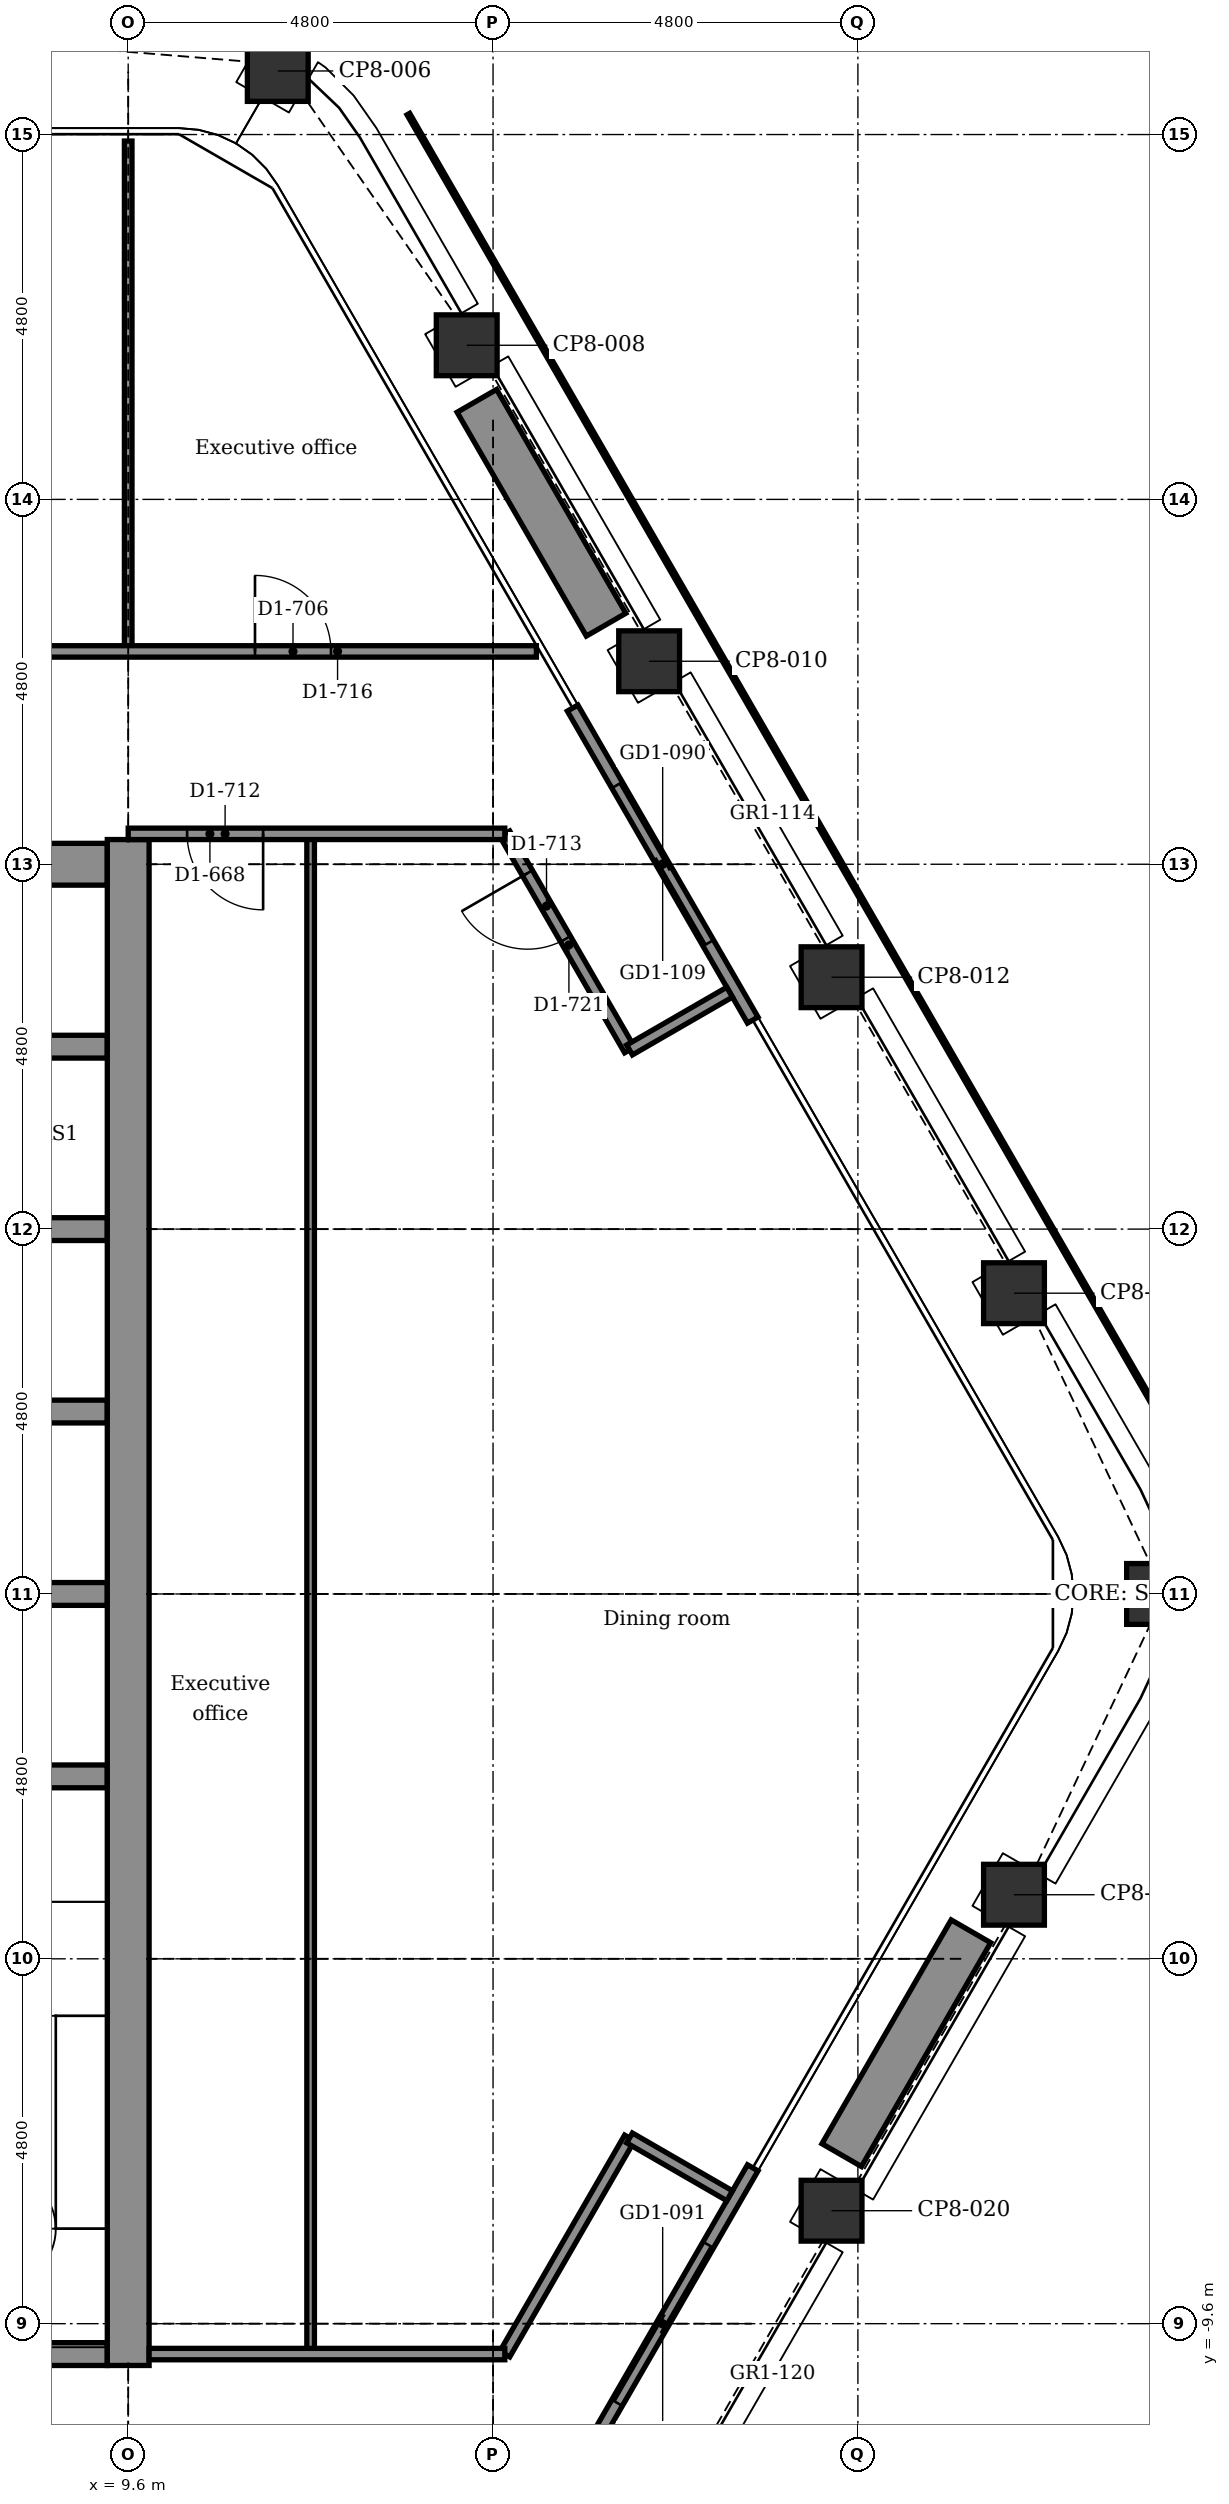
"""IFC4 building model, lengths in metres.
Left out: names, types, materials, properties, quantities, classifications, styles, units other than length and angle.
Written with IfcOpenShell. Run it as: python <this file> out.ifc"""

import sys

from ifc_helpers import new_model, si_unit, direction, frame, frame_2d, origin, origin_2d, place, context, subcontext, project, spatial, rectangle, extrude, element, fill, save


model = new_model("IFC4")
c1 = context("Model", 3, precision=1e-05, world=origin(), true_north=direction((0.0, 1.0)))
c2 = subcontext(c1, "Body", "Model", "MODEL_VIEW")
j1 = project(units=[si_unit("LENGTHUNIT", "METRE"), si_unit("PLANEANGLEUNIT", "RADIAN")], contexts=[c1])
p1 = place(None, origin())
s1 = spatial("IfcSite", under=j1, at=p1, CompositionType="ELEMENT")
p2 = place(p1, origin())
s2 = spatial("IfcBuilding", under=s1, at=p2, CompositionType="ELEMENT")
p3 = place(p2, frame((0.0, 0.0, 257.9)))
s3 = spatial("IfcBuildingStorey", under=s2, at=p3, CompositionType="ELEMENT", Elevation=257.9)
for number, where, z_axis, x_axis in (
    (1, (11.568, 20.036, -0.15), (0.0, 0.0, 1.0), (0.5, 0.866, 0.0)),
    (2, (14.054, 16.428, -0.15), (0.0, 0.0, 1.0), (0.866, 0.5, 0.0)),
    (3, (16.454, 12.271, -0.15), (0.0, 0.0, 1.0), (0.866, 0.5, 0.0)),
    (4, (18.854, 8.114, -0.15), (0.0, 0.0, 1.0), (0.866, 0.5, 0.0)),
    (5, (21.254, 3.957, -0.15), (0.0, 0.0, 1.0), (0.866, 0.5, 0.0)),
    (6, (23.136, 0.0, -0.15), (0.0, 0.0, 1.0), (1.0, 0.0, 0.0)),
    (7, (21.254, -3.957, -0.15), (0.0, 0.0, 1.0), (0.5, 0.866, 0.0)),
    (8, (18.854, -8.114, -0.15), (0.0, 0.0, 1.0), (0.5, 0.866, 0.0)),
):
    element("IfcColumn", number, at=place(p3, frame(where, z_axis=z_axis, x_axis=x_axis)), inside=s3, PredefinedType="COLUMN", context=c2, shape_type="SweptSolid", body=[
        extrude(rectangle(XDim=0.8, YDim=0.8, at=origin_2d()), origin(), (0.0, 0.0, 1.0), 3.9),
    ])
p4 = place(p3, frame((4.95, -10.0, -0.15), z_axis=(0.0, 0.0, 1.0), x_axis=(1.0, 0.0, 0.0)))
e9 = element("IfcWall", 9, at=p4, inside=s3, PredefinedType="STANDARD", context=c2, shape_type="SweptSolid", body=[
    extrude(rectangle(XDim=4.375, YDim=0.3, at=frame_2d((2.188, 0.0))), origin(), (0.0, 0.0, 1.0), 3.9),
])
for number, where, z_axis, x_axis in (
    (10, (6.15, -2.4, -0.15), (0.0, 0.0, 1.0), (1.0, 0.0, 0.0)),
    (11, (6.15, 0.0, -0.15), (0.0, 0.0, 1.0), (1.0, 0.0, 0.0)),
    (12, (6.15, 2.4, -0.15), (0.0, 0.0, 1.0), (1.0, 0.0, 0.0)),
    (13, (6.15, 4.8, -0.15), (0.0, 0.0, 1.0), (1.0, 0.0, 0.0)),
):
    element("IfcWall", number, at=place(p3, frame(where, z_axis=z_axis, x_axis=x_axis)), inside=s3, PredefinedType="STANDARD", context=c2, shape_type="SweptSolid", body=[
        extrude(rectangle(XDim=3.175, YDim=0.3, at=frame_2d((1.587, 0.0))), origin(), (0.0, 0.0, 1.0), 3.9),
    ])
p5 = place(p3, frame((6.0, 7.2, -0.15), z_axis=(0.0, 0.0, 1.0), x_axis=(1.0, 0.0, 0.0)))
e14 = element("IfcWall", 14, at=p5, inside=s3, PredefinedType="STANDARD", context=c2, shape_type="SweptSolid", body=[
    extrude(rectangle(XDim=3.325, YDim=0.3, at=frame_2d((1.663, 0.0))), origin(), (0.0, 0.0, 1.0), 3.9),
])
p6 = place(p3, frame((-5.25, 9.6, -0.15), z_axis=(0.0, 0.0, 1.0), x_axis=(1.0, 0.0, 0.0)))
e15 = element("IfcWall", 15, at=p6, inside=s3, PredefinedType="SHEAR", context=c2, shape_type="SweptSolid", body=[
    extrude(rectangle(XDim=14.575, YDim=0.55, at=frame_2d((7.288, 0.0))), origin(), (0.0, 0.0, 1.0), 3.9),
])
p7 = place(p6, frame((0.6, 0.0, 0.15)))
e16 = element("IfcOpeningElement", 16, at=p7, cuts=e15, PredefinedType="OPENING", context=c2, shape_type="SweptSolid", body=[
    extrude(rectangle(XDim=0.9, YDim=2.1, at=frame_2d((0.45, 1.05))), frame((0.0, 0.285, 0.0), z_axis=(0.0, -1.0, 0.0), x_axis=(1.0, 0.0, 0.0)), (0.0, 0.0, 1.0), 0.57),
])
p8 = place(p3, frame((9.6, -10.15, -0.15), z_axis=(0.0, 0.0, 1.0), x_axis=(0.0, 1.0, 0.0)))
e17 = element("IfcWall", 17, at=p8, inside=s3, PredefinedType="SHEAR", context=c2, shape_type="SweptSolid", body=[
    extrude(rectangle(XDim=20.075, YDim=0.55, at=frame_2d((10.038, 0.0))), origin(), (0.0, 0.0, 1.0), 3.9),
])
p9 = place(p3, frame((15.447, 11.655, 0.0), z_axis=(0.0, 0.0, 1.0), x_axis=(0.499978080042, -0.866038058908, 0.0)))
e18 = element("IfcWall", 18, at=p9, inside=s3, PredefinedType="PARTITIONING", context=c2, shape_type="SweptSolid", body=[
    extrude(rectangle(XDim=4.74, YDim=0.16, at=frame_2d((2.37, 0.0))), origin(), (0.0, 0.0, 1.0), 3.75),
])
p10 = place(p9, frame((1.17, 0.0, 0.0)))
e19 = element("IfcOpeningElement", 19, at=p10, cuts=e18, PredefinedType="OPENING", context=c2, shape_type="SweptSolid", body=[
    extrude(rectangle(XDim=2.4, YDim=2.4, at=frame_2d((1.2, 1.2))), frame((0.0, 0.09, 0.0), z_axis=(0.0, -1.0, 0.0), x_axis=(1.0, 0.0, 0.0)), (0.0, 0.0, 1.0), 0.18),
])
p11 = place(p3, frame((17.817, -7.55, 0.0), z_axis=(0.0, 0.0, 1.0), x_axis=(-0.499978080042, -0.866038058908, 0.0)))
e20 = element("IfcWall", 20, at=p11, inside=s3, PredefinedType="PARTITIONING", context=c2, shape_type="SweptSolid", body=[
    extrude(rectangle(XDim=4.74, YDim=0.16, at=frame_2d((2.37, 0.0))), origin(), (0.0, 0.0, 1.0), 3.75),
])
p12 = place(p11, frame((1.17, 0.0, 0.0)))
e21 = element("IfcOpeningElement", 21, at=p12, cuts=e20, PredefinedType="OPENING", context=c2, shape_type="SweptSolid", body=[
    extrude(rectangle(XDim=2.4, YDim=2.4, at=frame_2d((1.2, 1.2))), frame((0.0, 0.09, 0.0), z_axis=(0.0, -1.0, 0.0), x_axis=(1.0, 0.0, 0.0)), (0.0, 0.0, 1.0), 0.18),
])
p13 = place(p3, frame((14.187, 15.697, 0.0), z_axis=(0.0, 0.0, 1.0), x_axis=(0.499977295307, -0.866038511948, 0.0)))
e22 = element("IfcWall", 22, at=p13, inside=s3, PredefinedType="USERDEFINED", context=c2, shape_type="SweptSolid", body=[
    extrude(rectangle(XDim=3.4, YDim=0.6, at=frame_2d((1.7, 0.0))), origin(), (0.0, 0.0, 1.0), 0.7),
])
p14 = place(p3, frame((20.687, -4.438, 0.0), z_axis=(0.0, 0.0, 1.0), x_axis=(-0.500008388397, -0.866020560687, 0.0)))
e23 = element("IfcWall", 23, at=p14, inside=s3, PredefinedType="USERDEFINED", context=c2, shape_type="SweptSolid", body=[
    extrude(rectangle(XDim=3.4, YDim=0.6, at=frame_2d((1.7, 0.0))), origin(), (0.0, 0.0, 1.0), 0.7),
])
p15 = place(p3, frame((12.0, -10.0, 0.0), z_axis=(0.0, 0.0, 1.0), x_axis=(0.0, 1.0, 0.0)))
e24 = element("IfcWall", 24, at=p15, inside=s3, PredefinedType="PARTITIONING", context=c2, shape_type="SweptSolid", body=[
    extrude(rectangle(XDim=20.0, YDim=0.1, at=frame_2d((10.0, 0.0))), origin(), (0.0, 0.0, 1.0), 3.75),
])
p16 = place(p3, frame((9.6, 12.4, 0.0), z_axis=(0.0, 0.0, 1.0), x_axis=(0.0, 1.0, 0.0)))
e25 = element("IfcWall", 25, at=p16, inside=s3, PredefinedType="PARTITIONING", context=c2, shape_type="SweptSolid", body=[
    extrude(rectangle(XDim=6.715, YDim=0.1, at=frame_2d((3.357, 0.0))), origin(), (0.0, 0.0, 1.0), 3.217),
])
p17 = place(p3, frame((14.555, 10.0, 0.0), z_axis=(0.0, 0.0, 1.0), x_axis=(0.499954196102, -0.866051847062, 0.0)))
e26 = element("IfcWall", 26, at=p17, inside=s3, PredefinedType="PARTITIONING", context=c2, shape_type="SweptSolid", body=[
    extrude(rectangle(XDim=3.283, YDim=0.15, at=frame_2d((1.642, 0.0))), origin(), (0.0, 0.0, 1.0), 3.75),
])
p18 = place(p17, frame((0.597, 0.0, 0.0)))
e27 = element("IfcOpeningElement", 27, at=p18, cuts=e26, PredefinedType="OPENING", context=c2, shape_type="SweptSolid", body=[
    extrude(rectangle(XDim=1.0, YDim=2.1, at=frame_2d((0.5, 1.05))), frame((0.0, 0.085, 0.0), z_axis=(0.0, -1.0, 0.0), x_axis=(1.0, 0.0, 0.0)), (0.0, 0.0, 1.0), 0.17),
])
p19 = place(p3, frame((14.555, -10.0, 0.0), z_axis=(0.0, 0.0, 1.0), x_axis=(0.499954196102, 0.866051847062, 0.0)))
e28 = element("IfcWall", 28, at=p19, inside=s3, PredefinedType="PARTITIONING", context=c2, shape_type="SweptSolid", body=[
    extrude(rectangle(XDim=3.283, YDim=0.15, at=frame_2d((1.642, 0.0))), origin(), (0.0, 0.0, 1.0), 3.75),
])
for number, where, z_axis, x_axis in (
    (29, (16.196, -7.157, 0.0), (0.0, 0.0, 1.0), (0.866, -0.5, 0.0)),
    (30, (16.196, 7.157, 0.0), (0.0, 0.0, 1.0), (0.866, 0.5, 0.0)),
):
    element("IfcWall", number, at=place(p3, frame(where, z_axis=z_axis, x_axis=x_axis)), inside=s3, PredefinedType="PARTITIONING", context=c2, shape_type="SweptSolid", body=[
        extrude(rectangle(XDim=1.52, YDim=0.15, at=frame_2d((0.76, 0.0))), origin(), (0.0, 0.0, 1.0), 3.75),
    ])
p20 = place(p3, frame((9.875, -10.0, 0.0), z_axis=(0.0, 0.0, 1.0), x_axis=(1.0, 0.0, 0.0)))
e31 = element("IfcWall", 31, at=p20, inside=s3, PredefinedType="PARTITIONING", context=c2, shape_type="SweptSolid", body=[
    extrude(rectangle(XDim=4.68, YDim=0.15, at=frame_2d((2.34, 0.0))), origin(), (0.0, 0.0, 1.0), 3.75),
])
p21 = place(p3, frame((9.6, 10.0, 0.0), z_axis=(0.0, 0.0, 1.0), x_axis=(1.0, 0.0, 0.0)))
e32 = element("IfcWall", 32, at=p21, inside=s3, PredefinedType="PARTITIONING", context=c2, shape_type="SweptSolid", body=[
    extrude(rectangle(XDim=4.955, YDim=0.15, at=frame_2d((2.477, 0.0))), origin(), (0.0, 0.0, 1.0), 3.75),
])
p22 = place(p21, frame((0.775, 0.0, 0.0)))
e33 = element("IfcOpeningElement", 33, at=p22, cuts=e32, PredefinedType="OPENING", context=c2, shape_type="SweptSolid", body=[
    extrude(rectangle(XDim=1.0, YDim=2.1, at=frame_2d((0.5, 1.05))), frame((0.0, 0.085, 0.0), z_axis=(0.0, -1.0, 0.0), x_axis=(1.0, 0.0, 0.0)), (0.0, 0.0, 1.0), 0.17),
])
p23 = place(p3, frame((-14.97, 12.4, 0.0), z_axis=(0.0, 0.0, 1.0), x_axis=(1.0, 0.0, 0.0)))
e34 = element("IfcWall", 34, at=p23, inside=s3, PredefinedType="PARTITIONING", context=c2, shape_type="SweptSolid", body=[
    extrude(rectangle(XDim=29.94, YDim=0.15, at=frame_2d((14.97, 0.0))), origin(), (0.0, 0.0, 1.0), 3.75),
])
p24 = place(p23, frame((18.72, 0.0, 0.0)))
e35 = element("IfcOpeningElement", 35, at=p24, cuts=e34, PredefinedType="OPENING", context=c2, shape_type="SweptSolid", body=[
    extrude(rectangle(XDim=0.9, YDim=2.1, at=frame_2d((0.45, 1.05))), frame((0.0, 0.085, 0.0), z_axis=(0.0, -1.0, 0.0), x_axis=(1.0, 0.0, 0.0)), (0.0, 0.0, 1.0), 0.17),
])
p25 = place(p23, frame((21.72, 0.0, 0.0)))
e36 = element("IfcOpeningElement", 36, at=p25, cuts=e34, PredefinedType="OPENING", context=c2, shape_type="SweptSolid", body=[
    extrude(rectangle(XDim=0.9, YDim=2.1, at=frame_2d((0.45, 1.05))), frame((0.0, 0.085, 0.0), z_axis=(0.0, -1.0, 0.0), x_axis=(1.0, 0.0, 0.0)), (0.0, 0.0, 1.0), 0.17),
])
p26 = place(p23, frame((2.702, 0.0, 0.0)))
e37 = element("IfcOpeningElement", 37, at=p26, cuts=e34, PredefinedType="OPENING", context=c2, shape_type="SweptSolid", body=[
    extrude(rectangle(XDim=1.0, YDim=2.1, at=frame_2d((0.5, 1.05))), frame((0.0, 0.085, 0.0), z_axis=(0.0, -1.0, 0.0), x_axis=(1.0, 0.0, 0.0)), (0.0, 0.0, 1.0), 0.17),
])
p27 = place(p23, frame((9.265, 0.0, 0.0)))
e38 = element("IfcOpeningElement", 38, at=p27, cuts=e34, PredefinedType="OPENING", context=c2, shape_type="SweptSolid", body=[
    extrude(rectangle(XDim=1.0, YDim=2.1, at=frame_2d((0.5, 1.05))), frame((0.0, 0.085, 0.0), z_axis=(0.0, -1.0, 0.0), x_axis=(1.0, 0.0, 0.0)), (0.0, 0.0, 1.0), 0.17),
])
p28 = place(p23, frame((15.485, 0.0, 0.0)))
e39 = element("IfcOpeningElement", 39, at=p28, cuts=e34, PredefinedType="OPENING", context=c2, shape_type="SweptSolid", body=[
    extrude(rectangle(XDim=1.0, YDim=2.1, at=frame_2d((0.5, 1.05))), frame((0.0, 0.085, 0.0), z_axis=(0.0, -1.0, 0.0), x_axis=(1.0, 0.0, 0.0)), (0.0, 0.0, 1.0), 0.17),
])
p29 = place(p23, frame((26.238, 0.0, 0.0)))
e40 = element("IfcOpeningElement", 40, at=p29, cuts=e34, PredefinedType="OPENING", context=c2, shape_type="SweptSolid", body=[
    extrude(rectangle(XDim=1.0, YDim=2.1, at=frame_2d((0.5, 1.05))), frame((0.0, 0.085, 0.0), z_axis=(0.0, -1.0, 0.0), x_axis=(1.0, 0.0, 0.0)), (0.0, 0.0, 1.0), 0.17),
])
p30 = place(p10, origin())
e41 = element("IfcDoor", 41, at=p30, inside=s3, OperationType="DOUBLE_DOOR_SLIDING", PredefinedType="DOOR", context=c2, shape_type="SweptSolid", body=[
    extrude(rectangle(XDim=2.4, YDim=2.4, at=frame_2d((1.2, 1.2))), frame((0.0, 0.025, 0.0), z_axis=(0.0, -1.0, 0.0), x_axis=(1.0, 0.0, 0.0)), (0.0, 0.0, 1.0), 0.05),
])
fill(e19, e41)
p31 = place(p12, origin())
e42 = element("IfcDoor", 42, at=p31, inside=s3, OperationType="DOUBLE_DOOR_SLIDING", PredefinedType="DOOR", context=c2, shape_type="SweptSolid", body=[
    extrude(rectangle(XDim=2.4, YDim=2.4, at=frame_2d((1.2, 1.2))), frame((0.0, 0.025, 0.0), z_axis=(0.0, -1.0, 0.0), x_axis=(1.0, 0.0, 0.0)), (0.0, 0.0, 1.0), 0.05),
])
fill(e21, e42)
p32 = place(p29, origin())
e43 = element("IfcDoor", 43, at=p32, inside=s3, OperationType="SINGLE_SWING_LEFT", PredefinedType="DOOR", context=c2, shape_type="SweptSolid", body=[
    extrude(rectangle(XDim=1.0, YDim=2.1, at=frame_2d((0.5, 1.05))), frame((0.0, 0.025, 0.0), z_axis=(0.0, -1.0, 0.0), x_axis=(1.0, 0.0, 0.0)), (0.0, 0.0, 1.0), 0.05),
])
fill(e40, e43)
p33 = place(p22, frame((1.0, 0.0, 0.0), z_axis=(0.0, 0.0, 1.0), x_axis=(-1.0, 0.0, 0.0)))
e44 = element("IfcDoor", 44, at=p33, inside=s3, OperationType="SINGLE_SWING_RIGHT", PredefinedType="DOOR", context=c2, shape_type="SweptSolid", body=[
    extrude(rectangle(XDim=1.0, YDim=2.1, at=frame_2d((0.5, 1.05))), frame((0.0, 0.025, 0.0), z_axis=(0.0, -1.0, 0.0), x_axis=(1.0, 0.0, 0.0)), (0.0, 0.0, 1.0), 0.05),
])
fill(e33, e44)
p34 = place(p18, frame((1.0, 0.0, 0.0), z_axis=(0.0, 0.0, 1.0), x_axis=(-1.0, 0.0, 0.0)))
e45 = element("IfcDoor", 45, at=p34, inside=s3, OperationType="SINGLE_SWING_LEFT", PredefinedType="DOOR", context=c2, shape_type="SweptSolid", body=[
    extrude(rectangle(XDim=1.0, YDim=2.1, at=frame_2d((0.5, 1.05))), frame((0.0, 0.025, 0.0), z_axis=(0.0, -1.0, 0.0), x_axis=(1.0, 0.0, 0.0)), (0.0, 0.0, 1.0), 0.05),
])
fill(e27, e45)
save(model, sys.argv[1])
